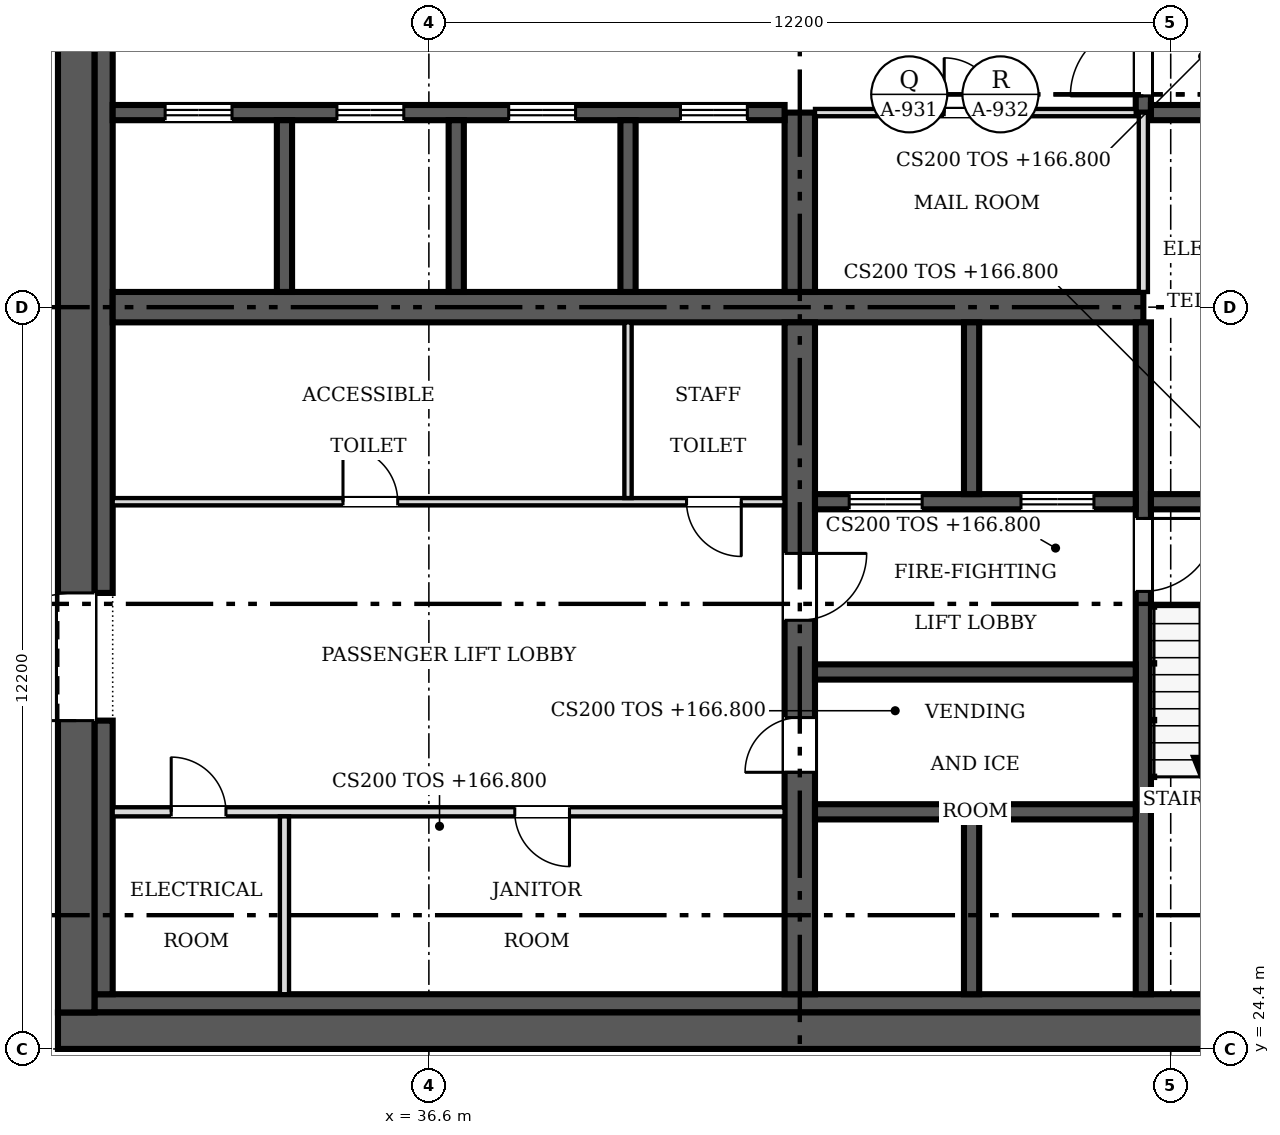
"""IFC4 building model, lengths in metres.
Left out: names, types, materials, properties, quantities, classifications, styles, units other than length and angle.
Written with IfcOpenShell. Run it as: python <this file> out.ifc"""

import sys

from ifc_helpers import new_model, si_unit, direction, frame, frame_2d, origin, place, context, subcontext, project, spatial, rectangle, extrude, source, transform, mapped, element, fill, save


model = new_model("IFC4")
c1 = context("Model", 3, precision=1e-05, world=origin(), true_north=direction((0.0, 1.0)))
c2 = subcontext(c1, "Body", "Model", "MODEL_VIEW")
j1 = project(units=[si_unit("LENGTHUNIT", "METRE"), si_unit("PLANEANGLEUNIT", "RADIAN")], contexts=[c1])
p1 = place(None, origin())
s1 = spatial("IfcSite", under=j1, at=p1, CompositionType="ELEMENT")
p2 = place(p1, origin())
s2 = spatial("IfcBuilding", under=s1, at=p2, CompositionType="ELEMENT")
p3 = place(p2, frame((0.0, 0.0, 166.8)))
s3 = spatial("IfcBuildingStorey", under=s2, at=p3, CompositionType="ELEMENT", Elevation=166.8)
p4 = place(p3, frame((54.9, 24.7, 0.0), z_axis=(0.0, 0.0, 1.0), x_axis=(-1.0, 0.0, 0.0)))
e1 = element("IfcWall", 1, at=p4, inside=s3, PredefinedType="SHEAR", context=c2, shape_type="SweptSolid", body=[
    extrude(rectangle(XDim=24.4, YDim=0.6, at=frame_2d((12.2, 0.0))), origin(), (0.0, 0.0, 1.0), 3.8),
])
m1 = source(origin(), c2, "Body", "SweptSolid", [
    extrude(rectangle(XDim=1.2, YDim=2.1, at=frame_2d((0.6, 1.05))), frame((0.0, 0.31, 0.0), z_axis=(0.0, -1.0, 0.0), x_axis=(1.0, 0.0, 0.0)), (0.0, 0.0, 1.0), 0.62),
])
p5 = place(p4, frame((1.5, 0.0, 0.0)))
e2 = element("IfcOpeningElement", 2, at=p5, cuts=e1, PredefinedType="OPENING", context=c2, shape_type="MappedRepresentation", body=[
    mapped(m1, transform((0.0, 0.0, 0.0), scale=1.0)),
])
p6 = place(p3, frame((30.8, 25.0, 0.0), z_axis=(0.0, 0.0, 1.0), x_axis=(0.0, 1.0, 0.0)))
e3 = element("IfcWall", 3, at=p6, inside=s3, PredefinedType="SHEAR", context=c2, shape_type="SweptSolid", body=[
    extrude(rectangle(XDim=23.2, YDim=0.6, at=frame_2d((11.6, 0.0))), origin(), (0.0, 0.0, 1.0), 3.8),
])
m2 = source(origin(), c2, "Body", "SweptSolid", [
    extrude(rectangle(XDim=2.1, YDim=2.4, at=frame_2d((1.05, 1.2))), frame((0.0, 0.31, 0.0), z_axis=(0.0, -1.0, 0.0), x_axis=(1.0, 0.0, 0.0)), (0.0, 0.0, 1.0), 0.62),
])
p7 = place(p6, frame((4.8, 0.0, 0.0)))
e4 = element("IfcOpeningElement", 4, at=p7, cuts=e3, PredefinedType="OPENING", context=c2, shape_type="MappedRepresentation", body=[
    mapped(m2, transform((0.0, 0.0, 0.0), scale=1.0)),
])
p8 = place(p6, frame((16.3, 0.0, 0.0)))
e5 = element("IfcOpeningElement", 5, at=p8, cuts=e3, PredefinedType="OPENING", context=c2, shape_type="MappedRepresentation", body=[
    mapped(m2, transform((0.0, 0.0, 0.0), scale=1.0)),
])
p9 = place(p3, frame((31.1, 25.15, 0.0), z_axis=(0.0, 0.0, 1.0), x_axis=(1.0, 0.0, 0.0)))
e6 = element("IfcWall", 6, at=p9, inside=s3, PredefinedType="SOLIDWALL", context=c2, shape_type="SweptSolid", body=[
    extrude(rectangle(XDim=21.1, YDim=0.3, at=frame_2d((10.55, 0.0))), origin(), (0.0, 0.0, 1.0), 3.8),
])
p10 = place(p3, frame((31.25, 25.3, 0.0), z_axis=(0.0, 0.0, 1.0), x_axis=(0.0, 1.0, 0.0)))
e7 = element("IfcWall", 7, at=p10, inside=s3, PredefinedType="SOLIDWALL", context=c2, shape_type="SweptSolid", body=[
    extrude(rectangle(XDim=4.5, YDim=0.3, at=frame_2d((2.25, 0.0))), origin(), (0.0, 0.0, 1.0), 3.8),
])
p11 = place(p3, frame((31.25, 31.9, 0.0), z_axis=(0.0, 0.0, 1.0), x_axis=(0.0, 1.0, 0.0)))
e8 = element("IfcWall", 8, at=p11, inside=s3, PredefinedType="SOLIDWALL", context=c2, shape_type="SweptSolid", body=[
    extrude(rectangle(XDim=9.4, YDim=0.3, at=frame_2d((4.7, 0.0))), origin(), (0.0, 0.0, 1.0), 3.8),
])
p12 = place(p3, frame((31.4, 36.6, 0.0), z_axis=(0.0, 0.0, 1.0), x_axis=(1.0, 0.0, 0.0)))
e9 = element("IfcWall", 9, at=p12, inside=s3, PredefinedType="SHEAR", context=c2, shape_type="SweptSolid", body=[
    extrude(rectangle(XDim=16.95, YDim=0.5, at=frame_2d((8.475, 0.0))), origin(), (0.0, 0.0, 1.0), 3.8),
])
p13 = place(p3, frame((42.7, 36.35, 0.0), z_axis=(0.0, 0.0, 1.0), x_axis=(0.0, -1.0, 0.0)))
e10 = element("IfcWall", 10, at=p13, inside=s3, PredefinedType="SHEAR", context=c2, shape_type="SweptSolid", body=[
    extrude(rectangle(XDim=11.05, YDim=0.5, at=frame_2d((5.525, 0.0))), origin(), (0.0, 0.0, 1.0), 3.8),
])
m3 = source(origin(), c2, "Body", "SweptSolid", [
    extrude(rectangle(XDim=0.9, YDim=2.1, at=frame_2d((0.45, 1.05))), frame((0.0, 0.26, 0.0), z_axis=(0.0, -1.0, 0.0), x_axis=(1.0, 0.0, 0.0)), (0.0, 0.0, 1.0), 0.52),
])
p14 = place(p13, frame((6.5, 0.0, 0.0)))
e11 = element("IfcOpeningElement", 11, at=p14, cuts=e10, PredefinedType="OPENING", context=c2, shape_type="MappedRepresentation", body=[
    mapped(m3, transform((0.0, 0.0, 0.0), scale=1.0)),
])
m4 = source(origin(), c2, "Body", "SweptSolid", [
    extrude(rectangle(XDim=1.1, YDim=2.1, at=frame_2d((0.55, 1.05))), frame((0.0, 0.26, 0.0), z_axis=(0.0, -1.0, 0.0), x_axis=(1.0, 0.0, 0.0)), (0.0, 0.0, 1.0), 0.52),
])
p15 = place(p13, frame((3.8, 0.0, 0.0)))
e12 = element("IfcOpeningElement", 12, at=p15, cuts=e10, PredefinedType="OPENING", context=c2, shape_type="MappedRepresentation", body=[
    mapped(m4, transform((0.0, 0.0, 0.0), scale=1.0)),
])
p16 = place(p3, frame((42.7, 36.85, 0.0), z_axis=(0.0, 0.0, 1.0), x_axis=(0.0, 1.0, 0.0)))
e13 = element("IfcWall", 13, at=p16, inside=s3, PredefinedType="SHEAR", context=c2, shape_type="SweptSolid", body=[
    extrude(rectangle(XDim=2.95, YDim=0.5, at=frame_2d((1.475, 0.0))), origin(), (0.0, 0.0, 1.0), 3.8),
])
p17 = place(p3, frame((31.4, 39.8, 0.0), z_axis=(0.0, 0.0, 1.0), x_axis=(1.0, 0.0, 0.0)))
e14 = element("IfcWall", 14, at=p17, inside=s3, PredefinedType="SOLIDWALL", context=c2, shape_type="SweptSolid", body=[
    extrude(rectangle(XDim=11.05, YDim=0.25, at=frame_2d((5.525, 0.0))), origin(), (0.0, 0.0, 1.0), 3.8),
])
m5 = source(origin(), c2, "Body", "SweptSolid", [
    extrude(rectangle(XDim=1.1, YDim=2.1, at=frame_2d((0.55, 1.05))), frame((0.0, 0.135, 0.0), z_axis=(0.0, -1.0, 0.0), x_axis=(1.0, 0.0, 0.0)), (0.0, 0.0, 1.0), 0.27),
])
p18 = place(p17, frame((0.863, 0.0, 0.0)))
e15 = element("IfcOpeningElement", 15, at=p18, cuts=e14, PredefinedType="OPENING", context=c2, shape_type="MappedRepresentation", body=[
    mapped(m5, transform((0.0, 0.0, 0.0), scale=1.0)),
])
p19 = place(p17, frame((3.688, 0.0, 0.0)))
e16 = element("IfcOpeningElement", 16, at=p19, cuts=e14, PredefinedType="OPENING", context=c2, shape_type="MappedRepresentation", body=[
    mapped(m5, transform((0.0, 0.0, 0.0), scale=1.0)),
])
p20 = place(p17, frame((6.512, 0.0, 0.0)))
e17 = element("IfcOpeningElement", 17, at=p20, cuts=e14, PredefinedType="OPENING", context=c2, shape_type="MappedRepresentation", body=[
    mapped(m5, transform((0.0, 0.0, 0.0), scale=1.0)),
])
p21 = place(p17, frame((9.337, 0.0, 0.0)))
e18 = element("IfcOpeningElement", 18, at=p21, cuts=e14, PredefinedType="OPENING", context=c2, shape_type="MappedRepresentation", body=[
    mapped(m5, transform((0.0, 0.0, 0.0), scale=1.0)),
])
p22 = place(p3, frame((48.35, 36.35, 0.0), z_axis=(0.0, 0.0, 1.0), x_axis=(0.0, -1.0, 0.0)))
e19 = element("IfcWall", 19, at=p22, inside=s3, PredefinedType="SOLIDWALL", context=c2, shape_type="SweptSolid", body=[
    extrude(rectangle(XDim=11.05, YDim=0.25, at=frame_2d((5.525, 0.0))), origin(), (0.0, 0.0, 1.0), 3.8),
])
m6 = source(origin(), c2, "Body", "SweptSolid", [
    extrude(rectangle(XDim=1.2, YDim=2.1, at=frame_2d((0.6, 1.05))), frame((0.0, 0.135, 0.0), z_axis=(0.0, -1.0, 0.0), x_axis=(1.0, 0.0, 0.0)), (0.0, 0.0, 1.0), 0.27),
])
p23 = place(p22, frame((3.225, 0.0, 0.0)))
e20 = element("IfcOpeningElement", 20, at=p23, cuts=e19, PredefinedType="OPENING", context=c2, shape_type="MappedRepresentation", body=[
    mapped(m6, transform((0.0, 0.0, 0.0), scale=1.0)),
])
p24 = place(p3, frame((48.225, 33.4, 0.0), z_axis=(0.0, 0.0, 1.0), x_axis=(-1.0, 0.0, 0.0)))
e21 = element("IfcWall", 21, at=p24, inside=s3, PredefinedType="SOLIDWALL", context=c2, shape_type="SweptSolid", body=[
    extrude(rectangle(XDim=5.275, YDim=0.25, at=frame_2d((2.638, 0.0))), origin(), (0.0, 0.0, 1.0), 3.8),
])
p25 = place(p24, frame((3.512, 0.0, 0.0)))
e22 = element("IfcOpeningElement", 22, at=p25, cuts=e21, PredefinedType="OPENING", context=c2, shape_type="MappedRepresentation", body=[
    mapped(m6, transform((0.0, 0.0, 0.0), scale=1.0)),
])
p26 = place(p24, frame((0.688, 0.0, 0.0)))
e23 = element("IfcOpeningElement", 23, at=p26, cuts=e21, PredefinedType="OPENING", context=c2, shape_type="MappedRepresentation", body=[
    mapped(m6, transform((0.0, 0.0, 0.0), scale=1.0)),
])
p27 = place(p3, frame((48.475, 33.4, 0.0), z_axis=(0.0, 0.0, 1.0), x_axis=(1.0, 0.0, 0.0)))
e24 = element("IfcWall", 24, at=p27, inside=s3, PredefinedType="SOLIDWALL", context=c2, shape_type="SweptSolid", body=[
    extrude(rectangle(XDim=3.525, YDim=0.25, at=frame_2d((1.762, 0.0))), origin(), (0.0, 0.0, 1.0), 3.8),
])
p28 = place(p3, frame((48.35, 47.9, 0.0), z_axis=(0.0, 0.0, 1.0), x_axis=(0.0, -1.0, 0.0)))
e25 = element("IfcWall", 25, at=p28, inside=s3, PredefinedType="SOLIDWALL", context=c2, shape_type="SweptSolid", body=[
    extrude(rectangle(XDim=8.1, YDim=0.25, at=frame_2d((4.05, 0.0))), origin(), (0.0, 0.0, 1.0), 3.8),
])
p29 = place(p28, frame((6.625, 0.0, 0.0)))
e26 = element("IfcOpeningElement", 26, at=p29, cuts=e25, PredefinedType="OPENING", context=c2, shape_type="MappedRepresentation", body=[
    mapped(m6, transform((0.0, 0.0, 0.0), scale=1.0)),
])
for number, where, z_axis, x_axis in (
    (27, (42.95, 28.3, 0.0), (0.0, 0.0, 1.0), (1.0, 0.0, 0.0)),
    (28, (42.95, 30.6, 0.0), (0.0, 0.0, 1.0), (1.0, 0.0, 0.0)),
):
    element("IfcWall", number, at=place(p3, frame(where, z_axis=z_axis, x_axis=x_axis)), inside=s3, PredefinedType="SOLIDWALL", context=c2, shape_type="SweptSolid", body=[
        extrude(rectangle(XDim=5.275, YDim=0.25, at=frame_2d((2.638, 0.0))), origin(), (0.0, 0.0, 1.0), 3.8),
    ])
p30 = place(p3, frame((48.475, 39.8, 0.0), z_axis=(0.0, 0.0, 1.0), x_axis=(1.0, 0.0, 0.0)))
e29 = element("IfcWall", 29, at=p30, inside=s3, PredefinedType="SOLIDWALL", context=c2, shape_type="SweptSolid", body=[
    extrude(rectangle(XDim=3.4, YDim=0.25, at=frame_2d((1.7, 0.0))), origin(), (0.0, 0.0, 1.0), 3.8),
])
for number, where, z_axis, x_axis in (
    (30, (34.225, 36.85, 0.0), (0.0, 0.0, 1.0), (0.0, 1.0, 0.0)),
    (31, (37.05, 36.85, 0.0), (0.0, 0.0, 1.0), (0.0, 1.0, 0.0)),
    (32, (39.875, 36.85, 0.0), (0.0, 0.0, 1.0), (0.0, 1.0, 0.0)),
):
    element("IfcWall", number, at=place(p3, frame(where, z_axis=z_axis, x_axis=x_axis)), inside=s3, PredefinedType="SOLIDWALL", context=c2, shape_type="SweptSolid", body=[
        extrude(rectangle(XDim=2.825, YDim=0.25, at=frame_2d((1.413, 0.0))), origin(), (0.0, 0.0, 1.0), 3.8),
    ])
p31 = place(p3, frame((45.525, 33.525, 0.0), z_axis=(0.0, 0.0, 1.0), x_axis=(0.0, 1.0, 0.0)))
e33 = element("IfcWall", 33, at=p31, inside=s3, PredefinedType="SOLIDWALL", context=c2, shape_type="SweptSolid", body=[
    extrude(rectangle(XDim=2.825, YDim=0.25, at=frame_2d((1.413, 0.0))), origin(), (0.0, 0.0, 1.0), 3.8),
])
p32 = place(p3, frame((45.525, 25.3, 0.0), z_axis=(0.0, 0.0, 1.0), x_axis=(0.0, 1.0, 0.0)))
e34 = element("IfcWall", 34, at=p32, inside=s3, PredefinedType="SOLIDWALL", context=c2, shape_type="SweptSolid", body=[
    extrude(rectangle(XDim=2.875, YDim=0.25, at=frame_2d((1.438, 0.0))), origin(), (0.0, 0.0, 1.0), 3.8),
])
p33 = place(p3, frame((42.45, 28.3, 0.0), z_axis=(0.0, 0.0, 1.0), x_axis=(-1.0, 0.0, 0.0)))
e35 = element("IfcWall", 35, at=p33, inside=s3, PredefinedType="PARTITIONING", context=c2, shape_type="SweptSolid", body=[
    extrude(rectangle(XDim=11.05, YDim=0.15, at=frame_2d((5.525, 0.0))), origin(), (0.0, 0.0, 1.0), 3.6),
])
m7 = source(origin(), c2, "Body", "SweptSolid", [
    extrude(rectangle(XDim=0.9, YDim=2.1, at=frame_2d((0.45, 1.05))), frame((0.0, 0.085, 0.0), z_axis=(0.0, -1.0, 0.0), x_axis=(1.0, 0.0, 0.0)), (0.0, 0.0, 1.0), 0.17),
])
p34 = place(p33, frame((9.188, 0.0, 0.0)))
e36 = element("IfcOpeningElement", 36, at=p34, cuts=e35, PredefinedType="OPENING", context=c2, shape_type="MappedRepresentation", body=[
    mapped(m7, transform((0.0, 0.0, 0.0), scale=1.0)),
])
p35 = place(p33, frame((3.538, 0.0, 0.0)))
e37 = element("IfcOpeningElement", 37, at=p35, cuts=e35, PredefinedType="OPENING", context=c2, shape_type="MappedRepresentation", body=[
    mapped(m7, transform((0.0, 0.0, 0.0), scale=1.0)),
])
p36 = place(p3, frame((31.4, 33.4, 0.0), z_axis=(0.0, 0.0, 1.0), x_axis=(1.0, 0.0, 0.0)))
e38 = element("IfcWall", 38, at=p36, inside=s3, PredefinedType="PARTITIONING", context=c2, shape_type="SweptSolid", body=[
    extrude(rectangle(XDim=11.05, YDim=0.12, at=frame_2d((5.525, 0.0))), origin(), (0.0, 0.0, 1.0), 3.6),
])
m8 = source(origin(), c2, "Body", "SweptSolid", [
    extrude(rectangle(XDim=0.9, YDim=2.1, at=frame_2d((0.45, 1.05))), frame((0.0, 0.07, 0.0), z_axis=(0.0, -1.0, 0.0), x_axis=(1.0, 0.0, 0.0)), (0.0, 0.0, 1.0), 0.14),
])
p37 = place(p36, frame((3.788, 0.0, 0.0)))
e39 = element("IfcOpeningElement", 39, at=p37, cuts=e38, PredefinedType="OPENING", context=c2, shape_type="MappedRepresentation", body=[
    mapped(m8, transform((0.0, 0.0, 0.0), scale=1.0)),
])
p38 = place(p36, frame((9.438, 0.0, 0.0)))
e40 = element("IfcOpeningElement", 40, at=p38, cuts=e38, PredefinedType="OPENING", context=c2, shape_type="MappedRepresentation", body=[
    mapped(m8, transform((0.0, 0.0, 0.0), scale=1.0)),
])
p39 = place(p3, frame((48.225, 39.8, 0.0), z_axis=(0.0, 0.0, 1.0), x_axis=(-1.0, 0.0, 0.0)))
e41 = element("IfcWall", 41, at=p39, inside=s3, PredefinedType="PARTITIONING", context=c2, shape_type="SweptSolid", body=[
    extrude(rectangle(XDim=5.275, YDim=0.12, at=frame_2d((2.638, 0.0))), origin(), (0.0, 0.0, 1.0), 3.6),
])
p40 = place(p39, frame((2.25, 0.0, 0.0)))
e42 = element("IfcOpeningElement", 42, at=p40, cuts=e41, PredefinedType="OPENING", context=c2, shape_type="MappedRepresentation", body=[
    mapped(m8, transform((0.0, 0.0, 0.0), scale=1.0)),
])
p41 = place(p3, frame((48.35, 36.85, 0.0), z_axis=(0.0, 0.0, 1.0), x_axis=(0.0, 1.0, 0.0)))
e43 = element("IfcWall", 43, at=p41, inside=s3, PredefinedType="PARTITIONING", context=c2, shape_type="SweptSolid", body=[
    extrude(rectangle(XDim=2.95, YDim=0.15, at=frame_2d((1.475, 0.0))), origin(), (0.0, 0.0, 1.0), 3.6),
])
p42 = place(p3, frame((39.875, 33.46, 0.0), z_axis=(0.0, 0.0, 1.0), x_axis=(0.0, 1.0, 0.0)))
e44 = element("IfcWall", 44, at=p42, inside=s3, PredefinedType="PARTITIONING", context=c2, shape_type="SweptSolid", body=[
    extrude(rectangle(XDim=2.89, YDim=0.12, at=frame_2d((1.445, 0.0))), origin(), (0.0, 0.0, 1.0), 3.6),
])
p43 = place(p3, frame((34.225, 25.3, 0.0), z_axis=(0.0, 0.0, 1.0), x_axis=(0.0, 1.0, 0.0)))
e45 = element("IfcWall", 45, at=p43, inside=s3, PredefinedType="PARTITIONING", context=c2, shape_type="SweptSolid", body=[
    extrude(rectangle(XDim=2.925, YDim=0.15, at=frame_2d((1.462, 0.0))), origin(), (0.0, 0.0, 1.0), 3.6),
])
m9 = source(origin(), c2, "Body", "SweptSolid", [
    extrude(rectangle(XDim=2.1, YDim=2.4, at=frame_2d((1.05, 1.2))), frame((0.0, 0.025, 0.0), z_axis=(0.0, -1.0, 0.0), x_axis=(1.0, 0.0, 0.0)), (0.0, 0.0, 1.0), 0.05),
])
p44 = place(p7, origin())
e46 = element("IfcDoor", 46, at=p44, inside=s3, OperationType="DOUBLE_DOOR_SINGLE_SWING", PredefinedType="DOOR", context=c2, shape_type="MappedRepresentation", body=[
    mapped(m9, transform((0.0, 0.0, 0.0), scale=1.0)),
])
fill(e4, e46)
m10 = source(origin(), c2, "Body", "SweptSolid", [
    extrude(rectangle(XDim=0.9, YDim=2.1, at=frame_2d((0.45, 1.05))), frame((0.0, 0.025, 0.0), z_axis=(0.0, -1.0, 0.0), x_axis=(1.0, 0.0, 0.0)), (0.0, 0.0, 1.0), 0.05),
])
p45 = place(p14, origin())
e47 = element("IfcDoor", 47, at=p45, inside=s3, OperationType="SINGLE_SWING_RIGHT", PredefinedType="DOOR", context=c2, shape_type="MappedRepresentation", body=[
    mapped(m10, transform((0.0, 0.0, 0.0), scale=1.0)),
])
fill(e11, e47)
m11 = source(origin(), c2, "Body", "SweptSolid", [
    extrude(rectangle(XDim=1.1, YDim=2.1, at=frame_2d((0.55, 1.05))), frame((0.0, 0.025, 0.0), z_axis=(0.0, -1.0, 0.0), x_axis=(1.0, 0.0, 0.0)), (0.0, 0.0, 1.0), 0.05),
])
p46 = place(p15, origin())
e48 = element("IfcDoor", 48, at=p46, inside=s3, OperationType="SINGLE_SWING_LEFT", PredefinedType="DOOR", context=c2, shape_type="MappedRepresentation", body=[
    mapped(m11, transform((0.0, 0.0, 0.0), scale=1.0)),
])
fill(e12, e48)
p47 = place(p18, origin())
e49 = element("IfcDoor", 49, at=p47, inside=s3, OperationType="DOUBLE_DOOR_SLIDING", PredefinedType="DOOR", context=c2, shape_type="MappedRepresentation", body=[
    mapped(m11, transform((0.0, 0.0, 0.0), scale=1.0)),
])
fill(e15, e49)
p48 = place(p19, origin())
e50 = element("IfcDoor", 50, at=p48, inside=s3, OperationType="DOUBLE_DOOR_SLIDING", PredefinedType="DOOR", context=c2, shape_type="MappedRepresentation", body=[
    mapped(m11, transform((0.0, 0.0, 0.0), scale=1.0)),
])
fill(e16, e50)
p49 = place(p20, origin())
e51 = element("IfcDoor", 51, at=p49, inside=s3, OperationType="DOUBLE_DOOR_SLIDING", PredefinedType="DOOR", context=c2, shape_type="MappedRepresentation", body=[
    mapped(m11, transform((0.0, 0.0, 0.0), scale=1.0)),
])
fill(e17, e51)
p50 = place(p21, origin())
e52 = element("IfcDoor", 52, at=p50, inside=s3, OperationType="DOUBLE_DOOR_SLIDING", PredefinedType="DOOR", context=c2, shape_type="MappedRepresentation", body=[
    mapped(m11, transform((0.0, 0.0, 0.0), scale=1.0)),
])
fill(e18, e52)
m12 = source(origin(), c2, "Body", "SweptSolid", [
    extrude(rectangle(XDim=1.2, YDim=2.1, at=frame_2d((0.6, 1.05))), frame((0.0, 0.025, 0.0), z_axis=(0.0, -1.0, 0.0), x_axis=(1.0, 0.0, 0.0)), (0.0, 0.0, 1.0), 0.05),
])
p51 = place(p23, origin())
e53 = element("IfcDoor", 53, at=p51, inside=s3, OperationType="SINGLE_SWING_LEFT", PredefinedType="DOOR", context=c2, shape_type="MappedRepresentation", body=[
    mapped(m12, transform((0.0, 0.0, 0.0), scale=1.0)),
])
fill(e20, e53)
p52 = place(p25, origin())
e54 = element("IfcDoor", 54, at=p52, inside=s3, OperationType="DOUBLE_DOOR_SLIDING", PredefinedType="DOOR", context=c2, shape_type="MappedRepresentation", body=[
    mapped(m12, transform((0.0, 0.0, 0.0), scale=1.0)),
])
fill(e22, e54)
p53 = place(p26, origin())
e55 = element("IfcDoor", 55, at=p53, inside=s3, OperationType="DOUBLE_DOOR_SLIDING", PredefinedType="DOOR", context=c2, shape_type="MappedRepresentation", body=[
    mapped(m12, transform((0.0, 0.0, 0.0), scale=1.0)),
])
fill(e23, e55)
p54 = place(p29, origin())
e56 = element("IfcDoor", 56, at=p54, inside=s3, OperationType="SINGLE_SWING_RIGHT", PredefinedType="DOOR", context=c2, shape_type="MappedRepresentation", body=[
    mapped(m12, transform((0.0, 0.0, 0.0), scale=1.0)),
])
fill(e26, e56)
p55 = place(p34, origin())
e57 = element("IfcDoor", 57, at=p55, inside=s3, OperationType="SINGLE_SWING_RIGHT", PredefinedType="DOOR", context=c2, shape_type="MappedRepresentation", body=[
    mapped(m10, transform((0.0, 0.0, 0.0), scale=1.0)),
])
fill(e36, e57)
p56 = place(p35, origin())
e58 = element("IfcDoor", 58, at=p56, inside=s3, OperationType="SINGLE_SWING_LEFT", PredefinedType="DOOR", context=c2, shape_type="MappedRepresentation", body=[
    mapped(m10, transform((0.0, 0.0, 0.0), scale=1.0)),
])
fill(e37, e58)
p57 = place(p37, origin())
e59 = element("IfcDoor", 59, at=p57, inside=s3, OperationType="SINGLE_SWING_LEFT", PredefinedType="DOOR", context=c2, shape_type="MappedRepresentation", body=[
    mapped(m10, transform((0.0, 0.0, 0.0), scale=1.0)),
])
fill(e39, e59)
p58 = place(p38, origin())
e60 = element("IfcDoor", 60, at=p58, inside=s3, OperationType="SINGLE_SWING_RIGHT", PredefinedType="DOOR", context=c2, shape_type="MappedRepresentation", body=[
    mapped(m10, transform((0.0, 0.0, 0.0), scale=1.0)),
])
fill(e40, e60)
p59 = place(p40, origin())
e61 = element("IfcDoor", 61, at=p59, inside=s3, OperationType="SINGLE_SWING_RIGHT", PredefinedType="DOOR", context=c2, shape_type="MappedRepresentation", body=[
    mapped(m10, transform((0.0, 0.0, 0.0), scale=1.0)),
])
fill(e42, e61)
save(model, sys.argv[1])
